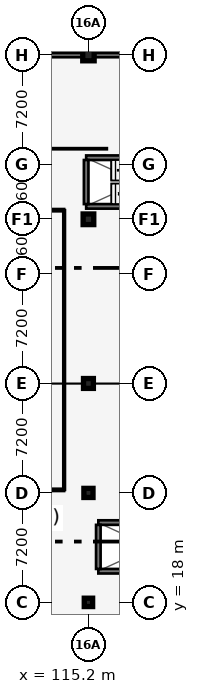
"""IFC4 building model, lengths in metres.
Left out: names, types, materials, properties, quantities, classifications, styles, units other than length and angle.
Written with IfcOpenShell. Run it as: python <this file> out.ifc"""

import sys

from ifc_helpers import new_model, si_unit, direction, frame, frame_2d, origin, origin_2d, place, context, subcontext, project, spatial, rectangle, extrude, element, fill, save


model = new_model("IFC4")
c1 = context("Model", 3, precision=1e-05, world=origin(), true_north=direction((0.0, 1.0)))
c2 = subcontext(c1, "Body", "Model", "MODEL_VIEW")
j1 = project(units=[si_unit("LENGTHUNIT", "METRE"), si_unit("PLANEANGLEUNIT", "RADIAN")], contexts=[c1])
p1 = place(None, origin())
s1 = spatial("IfcSite", under=j1, at=p1, CompositionType="ELEMENT")
p2 = place(p1, origin())
s2 = spatial("IfcBuilding", under=s1, at=p2, CompositionType="ELEMENT")
p3 = place(p2, frame((0.0, 0.0, 9.0)))
s3 = spatial("IfcBuildingStorey", under=s2, at=p3, CompositionType="ELEMENT", Elevation=9.0)
p4 = place(p3, frame((115.2, 18.0, 0.0), z_axis=(0.0, 0.0, 1.0), x_axis=(1.0, 0.0, 0.0)))
e1 = element("IfcColumn", 1, at=p4, inside=s3, PredefinedType="COLUMN", context=c2, shape_type="SweptSolid", body=[
    extrude(rectangle(XDim=0.55, YDim=0.55, at=origin_2d()), origin(), (0.0, 0.0, 1.0), 4.2),
])
p5 = place(p3, frame((115.2, 25.2, 0.0), z_axis=(0.0, 0.0, 1.0), x_axis=(1.0, 0.0, 0.0)))
e2 = element("IfcColumn", 2, at=p5, inside=s3, PredefinedType="COLUMN", context=c2, shape_type="SweptSolid", body=[
    extrude(rectangle(XDim=0.6, YDim=0.6, at=origin_2d()), origin(), (0.0, 0.0, 1.0), 4.2),
])
p6 = place(p3, frame((115.2, 32.4, 0.0), z_axis=(0.0, 0.0, 1.0), x_axis=(1.0, 0.0, 0.0)))
e3 = element("IfcColumn", 3, at=p6, inside=s3, PredefinedType="COLUMN", context=c2, shape_type="SweptSolid", body=[
    extrude(rectangle(XDim=0.65, YDim=0.65, at=origin_2d()), origin(), (0.0, 0.0, 1.0), 4.2),
])
p7 = place(p3, frame((115.2, 43.2, 0.0), z_axis=(0.0, 0.0, 1.0), x_axis=(1.0, 0.0, 0.0)))
e4 = element("IfcColumn", 4, at=p7, inside=s3, PredefinedType="COLUMN", context=c2, shape_type="SweptSolid", body=[
    extrude(rectangle(XDim=0.7, YDim=0.7, at=origin_2d()), origin(), (0.0, 0.0, 1.0), 4.2),
])
p8 = place(p3, frame((115.2, 54.0, 0.0), z_axis=(0.0, 0.0, 1.0), x_axis=(1.0, 0.0, 0.0)))
e5 = element("IfcColumn", 5, at=p8, inside=s3, PredefinedType="COLUMN", context=c2, shape_type="SweptSolid", body=[
    extrude(rectangle(XDim=0.75, YDim=0.75, at=origin_2d()), origin(), (0.0, 0.0, 1.0), 4.2),
])
p9 = place(p3, frame((122.4, 54.0, 0.0), z_axis=(0.0, 0.0, 1.0), x_axis=(-1.0, 0.0, 0.0)))
e6 = element("IfcWall", 6, at=p9, inside=s3, PredefinedType="SOLIDWALL", context=c2, shape_type="SweptSolid", body=[
    extrude(rectangle(XDim=14.4, YDim=0.28, at=frame_2d((7.2, 0.0))), origin(), (0.0, 0.0, 1.0), 3.4),
])
p10 = place(p9, frame((2.2, 0.0, 0.78)))
e7 = element("IfcOpeningElement", 7, at=p10, cuts=e6, PredefinedType="OPENING", context=c2, shape_type="SweptSolid", body=[
    extrude(rectangle(XDim=1.35, YDim=1.75, at=frame_2d((0.675, 0.875))), frame((0.0, 0.15, 0.0), z_axis=(0.0, -1.0, 0.0), x_axis=(1.0, 0.0, 0.0)), (0.0, 0.0, 1.0), 0.3),
])
p11 = place(p3, frame((115.85, 20.05, 0.0), z_axis=(0.0, 0.0, 1.0), x_axis=(1.0, 0.0, 0.0)))
e8 = element("IfcWall", 8, at=p11, inside=s3, PredefinedType="SHEAR", context=c2, shape_type="SweptSolid", body=[
    extrude(rectangle(XDim=7.1, YDim=0.3, at=frame_2d((3.55, 0.0))), origin(), (0.0, 0.0, 1.0), 3.875),
])
p12 = place(p11, frame((0.35, 0.0, 0.0)))
e9 = element("IfcOpeningElement", 9, at=p12, cuts=e8, PredefinedType="OPENING", context=c2, shape_type="SweptSolid", body=[
    extrude(rectangle(XDim=1.05, YDim=2.15, at=frame_2d((0.525, 1.075))), frame((0.0, 0.16, 0.0), z_axis=(0.0, -1.0, 0.0), x_axis=(1.0, 0.0, 0.0)), (0.0, 0.0, 1.0), 0.32),
])
p13 = place(p3, frame((122.95, 23.25, 0.0), z_axis=(0.0, 0.0, 1.0), x_axis=(-1.0, 0.0, 0.0)))
e10 = element("IfcWall", 10, at=p13, inside=s3, PredefinedType="SHEAR", context=c2, shape_type="SweptSolid", body=[
    extrude(rectangle(XDim=7.1, YDim=0.3, at=frame_2d((3.55, 0.0))), origin(), (0.0, 0.0, 1.0), 3.875),
])
p14 = place(p3, frame((115.85, 23.1, 0.0), z_axis=(0.0, 0.0, 1.0), x_axis=(0.0, -1.0, 0.0)))
e11 = element("IfcWall", 11, at=p14, inside=s3, PredefinedType="SHEAR", context=c2, shape_type="SweptSolid", body=[
    extrude(rectangle(XDim=2.9, YDim=0.3, at=frame_2d((1.45, 0.0))), origin(), (0.0, 0.0, 1.0), 3.875),
])
for number, where, z_axis, x_axis in (
    (12, (115.05, 44.05, 0.0), (0.0, 0.0, 1.0), (1.0, 0.0, 0.0)),
    (13, (122.15, 47.25, 0.0), (0.0, 0.0, 1.0), (-1.0, 0.0, 0.0)),
):
    element("IfcWall", number, at=place(p3, frame(where, z_axis=z_axis, x_axis=x_axis)), inside=s3, PredefinedType="SHEAR", context=c2, shape_type="SweptSolid", body=[
        extrude(rectangle(XDim=7.1, YDim=0.3, at=frame_2d((3.55, 0.0))), origin(), (0.0, 0.0, 1.0), 3.45),
    ])
p15 = place(p3, frame((115.05, 47.1, 0.0), z_axis=(0.0, 0.0, 1.0), x_axis=(0.0, -1.0, 0.0)))
e14 = element("IfcWall", 14, at=p15, inside=s3, PredefinedType="SHEAR", context=c2, shape_type="SweptSolid", body=[
    extrude(rectangle(XDim=2.9, YDim=0.3, at=frame_2d((1.45, 0.0))), origin(), (0.0, 0.0, 1.0), 3.45),
])
p16 = place(p15, frame((0.75, 0.0, 0.0)))
e15 = element("IfcOpeningElement", 15, at=p16, cuts=e14, PredefinedType="OPENING", context=c2, shape_type="SweptSolid", body=[
    extrude(rectangle(XDim=1.05, YDim=2.15, at=frame_2d((0.525, 1.075))), frame((0.0, 0.16, 0.0), z_axis=(0.0, -1.0, 0.0), x_axis=(1.0, 0.0, 0.0)), (0.0, 0.0, 1.0), 0.32),
])
p17 = place(p3, frame((108.8, 43.8, 0.0), z_axis=(0.0, 0.0, 1.0), x_axis=(1.0, 0.0, 0.0)))
e16 = element("IfcWall", 16, at=p17, inside=s3, PredefinedType="PARTITIONING", context=c2, shape_type="SweptSolid", body=[
    extrude(rectangle(XDim=4.8, YDim=0.15, at=frame_2d((2.4, 0.0))), origin(), (0.0, 0.0, 1.0), 3.6),
])
p18 = place(p3, frame((113.6, 25.4, 0.0), z_axis=(0.0, 0.0, 1.0), x_axis=(-1.0, 0.0, 0.0)))
e17 = element("IfcWall", 17, at=p18, inside=s3, PredefinedType="PARTITIONING", context=c2, shape_type="SweptSolid", body=[
    extrude(rectangle(XDim=4.8, YDim=0.15, at=frame_2d((2.4, 0.0))), origin(), (0.0, 0.0, 1.0), 2.952),
])
p19 = place(p3, frame((113.6, 25.4, 0.0), z_axis=(0.0, 0.0, 1.0), x_axis=(0.0, 1.0, 0.0)))
e18 = element("IfcWall", 18, at=p19, inside=s3, PredefinedType="PARTITIONING", context=c2, shape_type="SweptSolid", body=[
    extrude(rectangle(XDim=18.4, YDim=0.11, at=frame_2d((9.2, 0.0))), origin(), (0.0, 0.0, 1.0), 2.952),
])
p20 = place(p19, frame((8.715, 0.0, 0.0)))
e19 = element("IfcOpeningElement", 19, at=p20, cuts=e18, PredefinedType="OPENING", context=c2, shape_type="SweptSolid", body=[
    extrude(rectangle(XDim=0.97, YDim=2.15, at=frame_2d((0.485, 1.075))), frame((0.0, 0.065, 0.0), z_axis=(0.0, -1.0, 0.0), x_axis=(1.0, 0.0, 0.0)), (0.0, 0.0, 1.0), 0.13),
])
p21 = place(p12, origin())
e20 = element("IfcDoor", 20, at=p21, inside=s3, OperationType="SINGLE_SWING_LEFT", PredefinedType="DOOR", context=c2, shape_type="SweptSolid", body=[
    extrude(rectangle(XDim=1.05, YDim=2.15, at=frame_2d((0.525, 1.075))), frame((0.0, 0.025, 0.0), z_axis=(0.0, -1.0, 0.0), x_axis=(1.0, 0.0, 0.0)), (0.0, 0.0, 1.0), 0.05),
])
fill(e9, e20)
p22 = place(p16, origin())
e21 = element("IfcDoor", 21, at=p22, inside=s3, OperationType="SINGLE_SWING_LEFT", PredefinedType="DOOR", context=c2, shape_type="SweptSolid", body=[
    extrude(rectangle(XDim=1.05, YDim=2.15, at=frame_2d((0.525, 1.075))), frame((0.0, 0.025, 0.0), z_axis=(0.0, -1.0, 0.0), x_axis=(1.0, 0.0, 0.0)), (0.0, 0.0, 1.0), 0.05),
])
fill(e15, e21)
p23 = place(p20, origin())
e22 = element("IfcDoor", 22, at=p23, inside=s3, OperationType="SINGLE_SWING_RIGHT", PredefinedType="DOOR", context=c2, shape_type="SweptSolid", body=[
    extrude(rectangle(XDim=0.97, YDim=2.15, at=frame_2d((0.485, 1.075))), frame((0.0, 0.025, 0.0), z_axis=(0.0, -1.0, 0.0), x_axis=(1.0, 0.0, 0.0)), (0.0, 0.0, 1.0), 0.05),
])
fill(e19, e22)
save(model, sys.argv[1])
